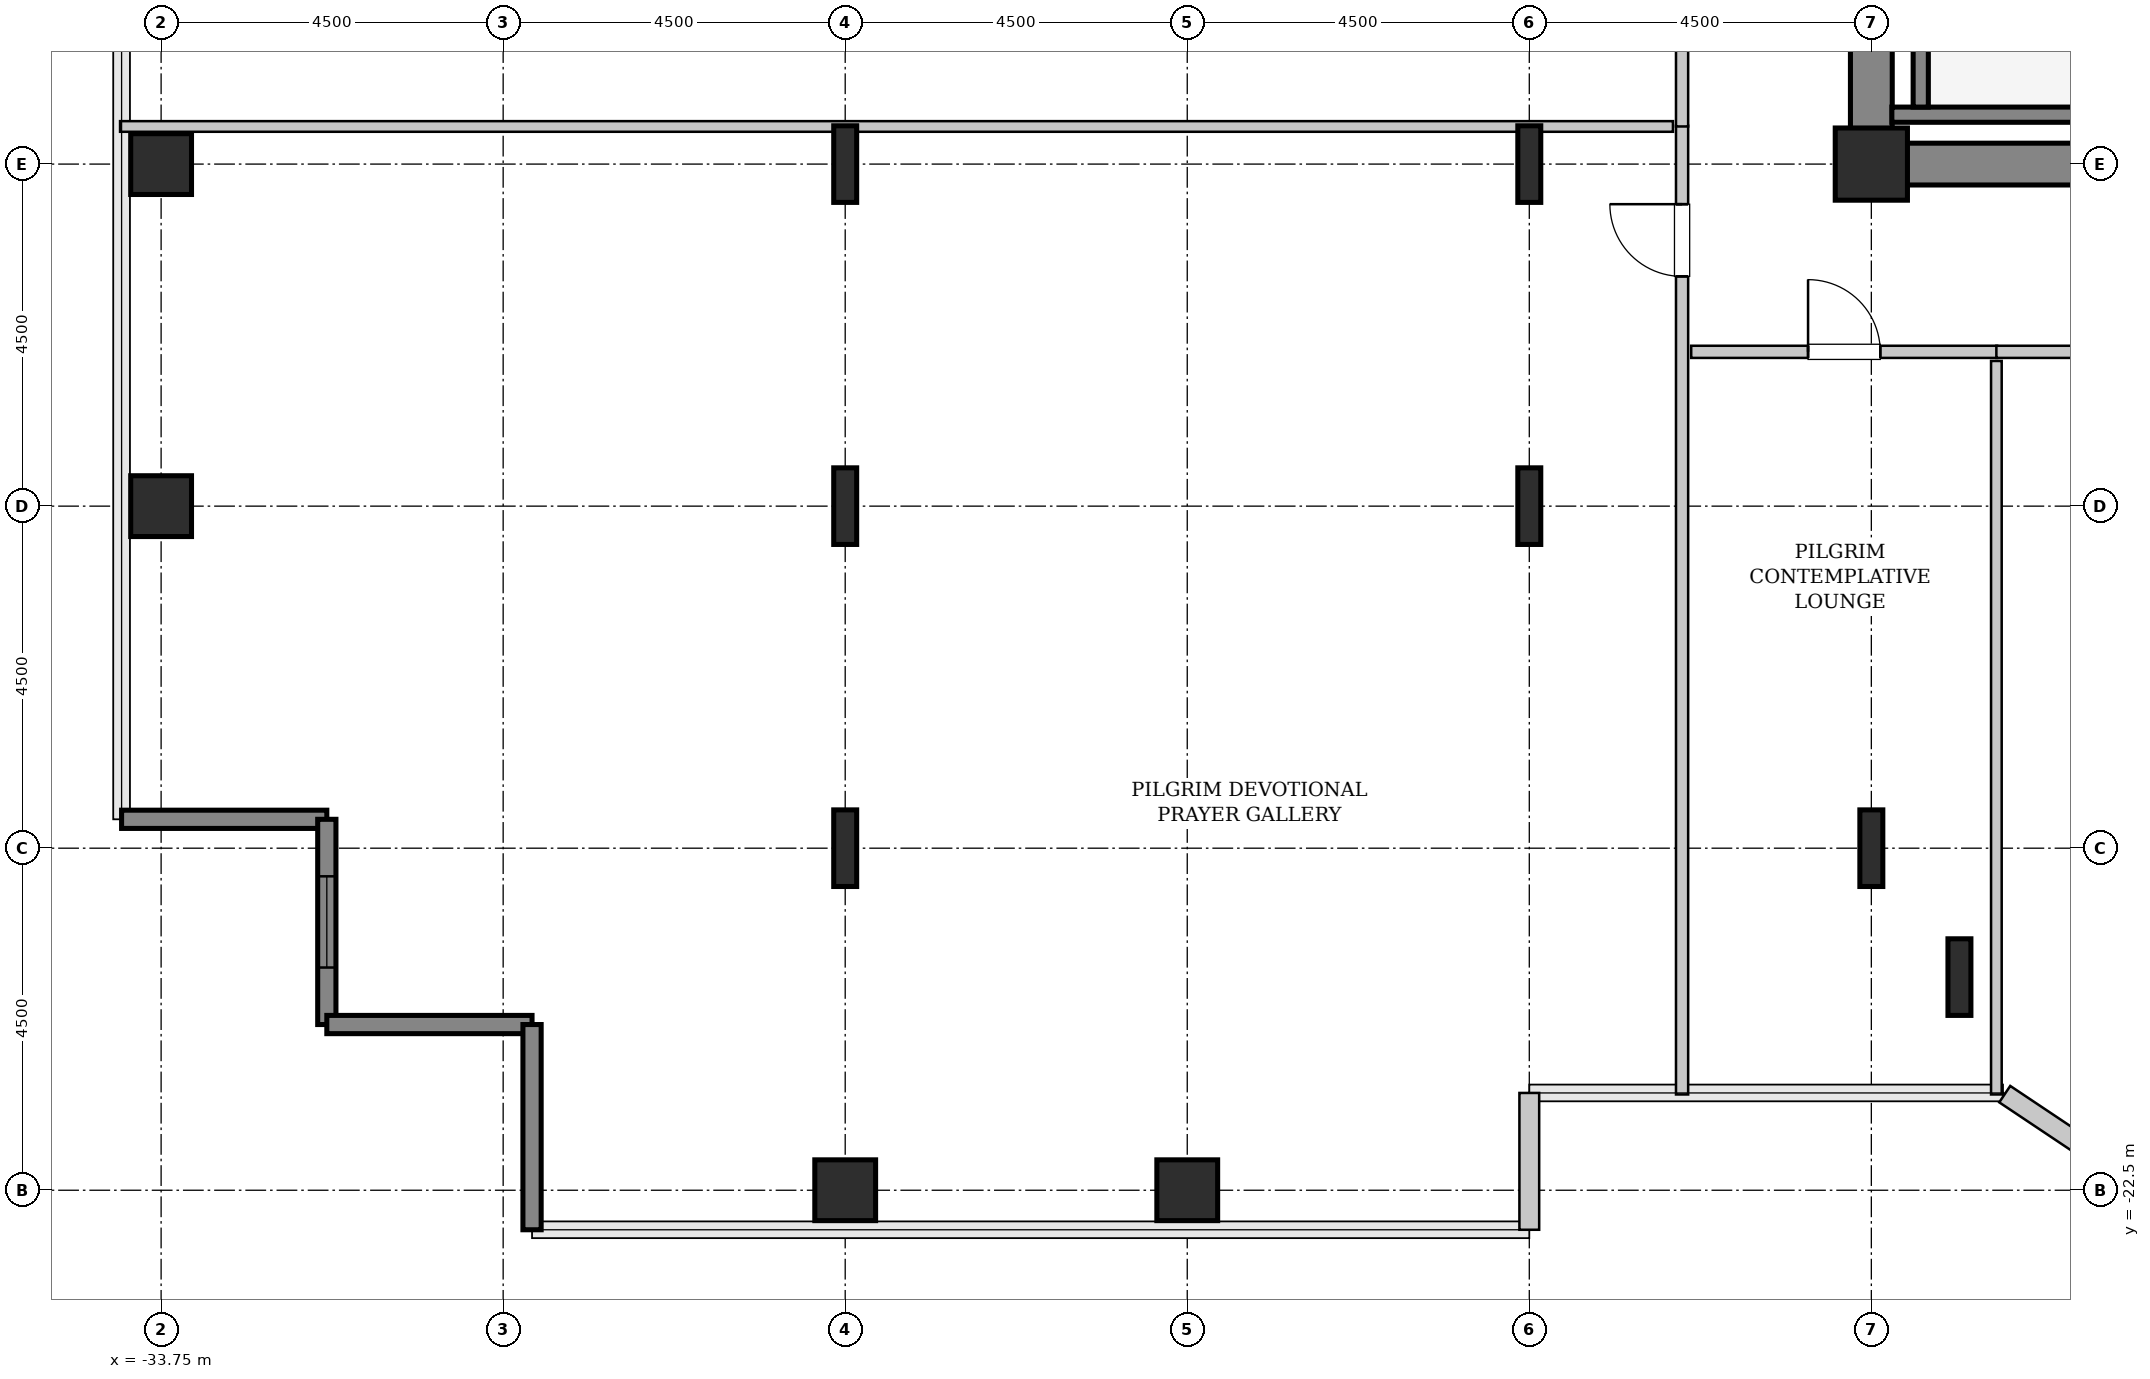
"""IFC4 building model, lengths in metres.
Left out: names, types, materials, properties, quantities, classifications, styles, units other than length and angle.
Written with IfcOpenShell. Run it as: python <this file> out.ifc"""

import sys

from ifc_helpers import new_model, si_unit, direction, frame, frame_2d, origin, origin_2d, place, context, subcontext, project, spatial, rectangle, hollow_rectangle, i_section, extrude, source, transform, mapped, element, fill, save


model = new_model("IFC4")
c1 = context("Model", 3, precision=1e-05, world=origin(), true_north=direction((0.0, 1.0)))
c2 = subcontext(c1, "Body", "Model", "MODEL_VIEW")
j1 = project(units=[si_unit("LENGTHUNIT", "METRE"), si_unit("PLANEANGLEUNIT", "RADIAN")], contexts=[c1])
p1 = place(None, origin())
s1 = spatial("IfcSite", under=j1, at=p1, CompositionType="ELEMENT")
p2 = place(p1, origin())
s2 = spatial("IfcBuilding", under=s1, at=p2, CompositionType="ELEMENT")
p3 = place(p2, frame((0.0, 0.0, 117.4)))
s3 = spatial("IfcBuildingStorey", under=s2, at=p3, CompositionType="ELEMENT", Elevation=117.4)
m1 = source(origin(), c2, "Body", "SweptSolid", [
    extrude(rectangle(XDim=9.975, YDim=0.55, at=frame_2d((4.987, 0.0))), origin(), (0.0, 0.0, 1.0), 3.8),
])
p4 = place(p3, frame((-11.525, -9.0, 0.0), z_axis=(0.0, 0.0, 1.0), x_axis=(1.0, 0.0, 0.0)))
e1 = element("IfcWall", 1, at=p4, inside=s3, PredefinedType="SHEAR", context=c2, shape_type="MappedRepresentation", body=[
    mapped(m1, transform((0.0, 0.0, 0.0), x_axis=(1.0, 0.0, 0.0), y_axis=(0.0, 1.0, 0.0), z_axis=(0.0, 0.0, 1.0), scale=1.0)),
])
m2 = source(origin(), c2, "Body", "SweptSolid", [
    extrude(rectangle(XDim=7.375, YDim=0.55, at=frame_2d((3.688, 0.0))), origin(), (0.0, 0.0, 1.0), 3.8),
])
p5 = place(p3, frame((-11.25, -8.725, 0.0), z_axis=(0.0, 0.0, 1.0), x_axis=(0.0, 1.0, 0.0)))
e2 = element("IfcWall", 2, at=p5, inside=s3, PredefinedType="SHEAR", context=c2, shape_type="MappedRepresentation", body=[
    mapped(m2, transform((0.0, 0.0, 0.0), x_axis=(1.0, 0.0, 0.0), y_axis=(0.0, 1.0, 0.0), z_axis=(0.0, 0.0, 1.0), scale=1.0)),
])
m3 = source(origin(), c2, "Body", "SweptSolid", [
    extrude(hollow_rectangle(XDim=0.8, YDim=0.8, WallThickness=0.04, InnerFilletRadius=0.04, OuterFilletRadius=0.08, at=origin_2d()), origin(), (0.0, 0.0, 1.0), 3.8),
])
for number, where, z_axis, x_axis in (
    (3, (-33.75, -13.5, 0.0), (0.0, 0.0, 1.0), (1.0, 0.0, 0.0)),
    (4, (-33.75, -9.0, 0.0), (0.0, 0.0, 1.0), (1.0, 0.0, 0.0)),
    (5, (-24.75, -22.5, 0.0), (0.0, 0.0, 1.0), (1.0, 0.0, 0.0)),
):
    element("IfcColumn", number, at=place(p3, frame(where, z_axis=z_axis, x_axis=x_axis)), inside=s3, PredefinedType="COLUMN", context=c2, shape_type="MappedRepresentation", body=[
        mapped(m3, transform((0.0, 0.0, 0.0), x_axis=(1.0, 0.0, 0.0), y_axis=(0.0, 1.0, 0.0), z_axis=(0.0, 0.0, 1.0), scale=1.0)),
    ])
m4 = source(origin(), c2, "Body", "SweptSolid", [
    extrude(i_section(OverallWidth=0.302, OverallDepth=1.008, WebThickness=0.021, FlangeThickness=0.04, FilletRadius=0.03, at=origin_2d()), origin(), (0.0, 0.0, 1.0), 3.8),
])
for number, where, z_axis, x_axis in (
    (6, (-24.75, -18.0, 0.0), (0.0, 0.0, 1.0), (1.0, 0.0, 0.0)),
    (7, (-24.75, -13.5, 0.0), (0.0, 0.0, 1.0), (1.0, 0.0, 0.0)),
    (8, (-24.75, -9.0, 0.0), (0.0, 0.0, 1.0), (1.0, 0.0, 0.0)),
):
    element("IfcColumn", number, at=place(p3, frame(where, z_axis=z_axis, x_axis=x_axis)), inside=s3, PredefinedType="COLUMN", context=c2, shape_type="MappedRepresentation", body=[
        mapped(m4, transform((0.0, 0.0, 0.0), x_axis=(1.0, 0.0, 0.0), y_axis=(0.0, 1.0, 0.0), z_axis=(0.0, 0.0, 1.0), scale=1.0)),
    ])
p6 = place(p3, frame((-20.25, -22.5, 0.0), z_axis=(0.0, 0.0, 1.0), x_axis=(1.0, 0.0, 0.0)))
e9 = element("IfcColumn", 9, at=p6, inside=s3, PredefinedType="COLUMN", context=c2, shape_type="MappedRepresentation", body=[
    mapped(m3, transform((0.0, 0.0, 0.0), x_axis=(1.0, 0.0, 0.0), y_axis=(0.0, 1.0, 0.0), z_axis=(0.0, 0.0, 1.0), scale=1.0)),
])
for number, where, z_axis, x_axis in (
    (10, (-15.75, -13.5, 0.0), (0.0, 0.0, 1.0), (1.0, 0.0, 0.0)),
    (11, (-15.75, -9.0, 0.0), (0.0, 0.0, 1.0), (1.0, 0.0, 0.0)),
    (12, (-11.25, -18.0, 0.0), (0.0, 0.0, 1.0), (1.0, 0.0, 0.0)),
):
    element("IfcColumn", number, at=place(p3, frame(where, z_axis=z_axis, x_axis=x_axis)), inside=s3, PredefinedType="COLUMN", context=c2, shape_type="MappedRepresentation", body=[
        mapped(m4, transform((0.0, 0.0, 0.0), x_axis=(1.0, 0.0, 0.0), y_axis=(0.0, 1.0, 0.0), z_axis=(0.0, 0.0, 1.0), scale=1.0)),
    ])
m5 = source(origin(), c2, "Body", "SweptSolid", [
    extrude(hollow_rectangle(XDim=0.95, YDim=0.95, WallThickness=0.045, InnerFilletRadius=0.045, OuterFilletRadius=0.09, at=origin_2d()), origin(), (0.0, 0.0, 1.0), 3.8),
])
p7 = place(p3, frame((-11.25, -9.0, 0.0), z_axis=(0.0, 0.0, 1.0), x_axis=(1.0, 0.0, 0.0)))
e13 = element("IfcColumn", 13, at=p7, inside=s3, PredefinedType="COLUMN", context=c2, shape_type="MappedRepresentation", body=[
    mapped(m5, transform((0.0, 0.0, 0.0), x_axis=(1.0, 0.0, 0.0), y_axis=(0.0, 1.0, 0.0), z_axis=(0.0, 0.0, 1.0), scale=1.0)),
])
p8 = place(p3, frame((-10.091, -19.696, 0.0), z_axis=(0.0, 0.0, 1.0), x_axis=(1.0, 0.0, 0.0)))
e14 = element("IfcColumn", 14, at=p8, inside=s3, PredefinedType="COLUMN", context=c2, shape_type="MappedRepresentation", body=[
    mapped(m4, transform((0.0, 0.0, 0.0), x_axis=(1.0, 0.0, 0.0), y_axis=(0.0, 1.0, 0.0), z_axis=(0.0, 0.0, 1.0), scale=1.0)),
])
m6 = source(origin(), c2, "Body", "SweptSolid", [
    extrude(rectangle(XDim=2.7, YDim=0.24, at=frame_2d((1.35, 0.0))), origin(), (0.0, 0.0, 1.0), 3.55),
])
p9 = place(p3, frame((-34.27, -17.62, 0.0), z_axis=(0.0, 0.0, 1.0), x_axis=(1.0, 0.0, 0.0)))
e15 = element("IfcWall", 15, at=p9, inside=s3, PredefinedType="SHEAR", context=c2, shape_type="MappedRepresentation", body=[
    mapped(m6, transform((0.0, 0.0, 0.0), x_axis=(1.0, 0.0, 0.0), y_axis=(0.0, 1.0, 0.0), z_axis=(0.0, 0.0, 1.0), scale=1.0)),
])
p10 = place(p3, frame((-31.57, -17.62, 0.0), z_axis=(0.0, 0.0, 1.0), x_axis=(0.0, -1.0, 0.0)))
e16 = element("IfcWall", 16, at=p10, inside=s3, PredefinedType="SHEAR", context=c2, shape_type="MappedRepresentation", body=[
    mapped(m6, transform((0.0, 0.0, 0.0), x_axis=(1.0, 0.0, 0.0), y_axis=(0.0, 1.0, 0.0), z_axis=(0.0, 0.0, 1.0), scale=1.0)),
])
p11 = place(p10, frame((0.75, 0.0, 0.85)))
e17 = element("IfcOpeningElement", 17, at=p11, cuts=e16, PredefinedType="OPENING", context=c2, shape_type="SweptSolid", body=[
    extrude(rectangle(XDim=1.2, YDim=1.8, at=frame_2d((0.6, 0.9))), frame((0.0, 0.13, 0.0), z_axis=(0.0, -1.0, 0.0), x_axis=(1.0, 0.0, 0.0)), (0.0, 0.0, 1.0), 0.26),
])
for number, where, z_axis, x_axis in (
    (18, (-31.57, -20.32, 0.0), (0.0, 0.0, 1.0), (1.0, 0.0, 0.0)),
    (19, (-28.87, -20.32, 0.0), (0.0, 0.0, 1.0), (0.0, -1.0, 0.0)),
):
    element("IfcWall", number, at=place(p3, frame(where, z_axis=z_axis, x_axis=x_axis)), inside=s3, PredefinedType="SHEAR", context=c2, shape_type="MappedRepresentation", body=[
        mapped(m6, transform((0.0, 0.0, 0.0), x_axis=(1.0, 0.0, 0.0), y_axis=(0.0, 1.0, 0.0), z_axis=(0.0, 0.0, 1.0), scale=1.0)),
    ])
m7 = source(origin(), c2, "Body", "SweptSolid", [
    extrude(rectangle(XDim=1.8, YDim=0.26, at=frame_2d((0.9, 0.0))), origin(), (0.0, 0.0, 1.0), 3.55),
])
p12 = place(p3, frame((-15.75, -23.02, 0.0), z_axis=(0.0, 0.0, 1.0), x_axis=(0.0, 1.0, 0.0)))
e20 = element("IfcWall", 20, at=p12, inside=s3, PredefinedType="SOLIDWALL", context=c2, shape_type="MappedRepresentation", body=[
    mapped(m7, transform((0.0, 0.0, 0.0), x_axis=(1.0, 0.0, 0.0), y_axis=(0.0, 1.0, 0.0), z_axis=(0.0, 0.0, 1.0), scale=1.0)),
])
m8 = source(origin(), c2, "Body", "SweptSolid", [
    extrude(rectangle(XDim=1.469, YDim=0.26, at=frame_2d((0.734, 0.0))), origin(), (0.0, 0.0, 1.0), 3.55),
])
p13 = place(p3, frame((-9.495, -21.236, 0.0), z_axis=(0.0, 0.0, 1.0), x_axis=(0.831461760506, -0.555581983884, 0.0)))
e21 = element("IfcWall", 21, at=p13, inside=s3, PredefinedType="SOLIDWALL", context=c2, shape_type="MappedRepresentation", body=[
    mapped(m8, transform((0.0, 0.0, 0.0), x_axis=(1.0, 0.0, 0.0), y_axis=(0.0, 1.0, 0.0), z_axis=(0.0, 0.0, 1.0), scale=1.0)),
])
m9 = source(origin(), c2, "Body", "SweptSolid", [
    extrude(rectangle(XDim=3.68, YDim=0.2, at=frame_2d((1.84, 0.0))), origin(), (0.0, 0.0, 1.0), 3.8),
])
p14 = place(p3, frame((-10.98, -8.35, 0.0), z_axis=(0.0, 0.0, 1.0), x_axis=(1.0, 0.0, 0.0)))
e22 = element("IfcWall", 22, at=p14, inside=s3, PredefinedType="SOLIDWALL", context=c2, shape_type="MappedRepresentation", body=[
    mapped(m9, transform((0.0, 0.0, 0.0), x_axis=(1.0, 0.0, 0.0), y_axis=(0.0, 1.0, 0.0), z_axis=(0.0, 0.0, 1.0), scale=1.0)),
])
m10 = source(origin(), c2, "Body", "SweptSolid", [
    extrude(rectangle(XDim=7.1, YDim=0.2, at=frame_2d((3.55, 0.0))), origin(), (0.0, 0.0, 1.0), 3.8),
])
p15 = place(p3, frame((-10.6, -1.15, 0.0), z_axis=(0.0, 0.0, 1.0), x_axis=(0.0, -1.0, 0.0)))
e23 = element("IfcWall", 23, at=p15, inside=s3, PredefinedType="SOLIDWALL", context=c2, shape_type="MappedRepresentation", body=[
    mapped(m10, transform((0.0, 0.0, 0.0), x_axis=(1.0, 0.0, 0.0), y_axis=(0.0, 1.0, 0.0), z_axis=(0.0, 0.0, 1.0), scale=1.0)),
])
m11 = source(origin(), c2, "Body", "SweptSolid", [
    extrude(rectangle(XDim=12.745, YDim=0.16, at=frame_2d((6.373, 0.0))), origin(), (0.0, 0.0, 1.0), 3.535),
])
p16 = place(p3, frame((-13.74, -21.24, 0.0), z_axis=(0.0, 0.0, 1.0), x_axis=(0.0, 1.0, 0.0)))
e24 = element("IfcWall", 24, at=p16, inside=s3, PredefinedType="PARTITIONING", context=c2, shape_type="MappedRepresentation", body=[
    mapped(m11, transform((0.0, 0.0, 0.0), x_axis=(1.0, 0.0, 0.0), y_axis=(0.0, 1.0, 0.0), z_axis=(0.0, 0.0, 1.0), scale=1.0)),
])
p17 = place(p16, frame((10.762, 0.0, 0.0)))
e25 = element("IfcOpeningElement", 25, at=p17, cuts=e24, PredefinedType="OPENING", context=c2, shape_type="SweptSolid", body=[
    extrude(rectangle(XDim=0.95, YDim=2.1, at=frame_2d((0.475, 1.05))), frame((0.0, 0.09, 0.0), z_axis=(0.0, -1.0, 0.0), x_axis=(1.0, 0.0, 0.0)), (0.0, 0.0, 1.0), 0.18),
])
m12 = source(origin(), c2, "Body", "SweptSolid", [
    extrude(rectangle(XDim=20.43, YDim=0.14, at=frame_2d((10.215, 0.0))), origin(), (0.0, 0.0, 1.0), 2.875),
])
p18 = place(p3, frame((-34.29, -8.505, 0.0), z_axis=(0.0, 0.0, 1.0), x_axis=(1.0, 0.0, 0.0)))
e26 = element("IfcWall", 26, at=p18, inside=s3, PredefinedType="PARTITIONING", context=c2, shape_type="MappedRepresentation", body=[
    mapped(m12, transform((0.0, 0.0, 0.0), x_axis=(1.0, 0.0, 0.0), y_axis=(0.0, 1.0, 0.0), z_axis=(0.0, 0.0, 1.0), scale=1.0)),
])
m13 = source(origin(), c2, "Body", "SweptSolid", [
    extrude(rectangle(XDim=3.31, YDim=0.16, at=frame_2d((1.655, 0.0))), origin(), (0.0, 0.0, 1.0), 3.535),
])
p19 = place(p3, frame((-13.74, -8.505, 0.0), z_axis=(0.0, 0.0, 1.0), x_axis=(0.0, 1.0, 0.0)))
e27 = element("IfcWall", 27, at=p19, inside=s3, PredefinedType="PARTITIONING", context=c2, shape_type="MappedRepresentation", body=[
    mapped(m13, transform((0.0, 0.0, 0.0), x_axis=(1.0, 0.0, 0.0), y_axis=(0.0, 1.0, 0.0), z_axis=(0.0, 0.0, 1.0), scale=1.0)),
])
p20 = place(p19, frame((1.18, 0.0, 0.0)))
e28 = element("IfcOpeningElement", 28, at=p20, cuts=e27, PredefinedType="OPENING", context=c2, shape_type="SweptSolid", body=[
    extrude(rectangle(XDim=0.95, YDim=2.1, at=frame_2d((0.475, 1.05))), frame((0.0, 0.09, 0.0), z_axis=(0.0, -1.0, 0.0), x_axis=(1.0, 0.0, 0.0)), (0.0, 0.0, 1.0), 0.18),
])
m14 = source(origin(), c2, "Body", "SweptSolid", [
    extrude(rectangle(XDim=4.025, YDim=0.16, at=frame_2d((2.013, 0.0))), origin(), (0.0, 0.0, 1.0), 3.535),
])
p21 = place(p3, frame((-13.62, -11.47, 0.0), z_axis=(0.0, 0.0, 1.0), x_axis=(1.0, 0.0, 0.0)))
e29 = element("IfcWall", 29, at=p21, inside=s3, PredefinedType="PARTITIONING", context=c2, shape_type="MappedRepresentation", body=[
    mapped(m14, transform((0.0, 0.0, 0.0), x_axis=(1.0, 0.0, 0.0), y_axis=(0.0, 1.0, 0.0), z_axis=(0.0, 0.0, 1.0), scale=1.0)),
])
p22 = place(p21, frame((1.538, 0.0, 0.0)))
e30 = element("IfcOpeningElement", 30, at=p22, cuts=e29, PredefinedType="OPENING", context=c2, shape_type="SweptSolid", body=[
    extrude(rectangle(XDim=0.95, YDim=2.1, at=frame_2d((0.475, 1.05))), frame((0.0, 0.09, 0.0), z_axis=(0.0, -1.0, 0.0), x_axis=(1.0, 0.0, 0.0)), (0.0, 0.0, 1.0), 0.18),
])
m15 = source(origin(), c2, "Body", "SweptSolid", [
    extrude(rectangle(XDim=9.65, YDim=0.14, at=frame_2d((4.825, 0.0))), origin(), (0.0, 0.0, 1.0), 3.535),
])
p23 = place(p3, frame((-9.605, -21.24, 0.0), z_axis=(0.0, 0.0, 1.0), x_axis=(0.0, 1.0, 0.0)))
e31 = element("IfcWall", 31, at=p23, inside=s3, PredefinedType="PARTITIONING", context=c2, shape_type="MappedRepresentation", body=[
    mapped(m15, transform((0.0, 0.0, 0.0), x_axis=(1.0, 0.0, 0.0), y_axis=(0.0, 1.0, 0.0), z_axis=(0.0, 0.0, 1.0), scale=1.0)),
])
m16 = source(origin(), c2, "Body", "SweptSolid", [
    extrude(rectangle(XDim=4.61, YDim=0.16, at=frame_2d((2.305, 0.0))), origin(), (0.0, 0.0, 1.0), 3.535),
])
p24 = place(p3, frame((-9.605, -11.47, 0.0), z_axis=(0.0, 0.0, 1.0), x_axis=(1.0, 0.0, 0.0)))
e32 = element("IfcWall", 32, at=p24, inside=s3, PredefinedType="PARTITIONING", context=c2, shape_type="MappedRepresentation", body=[
    mapped(m16, transform((0.0, 0.0, 0.0), x_axis=(1.0, 0.0, 0.0), y_axis=(0.0, 1.0, 0.0), z_axis=(0.0, 0.0, 1.0), scale=1.0)),
])
p25 = place(p24, frame((1.83, 0.0, 0.0)))
e33 = element("IfcOpeningElement", 33, at=p25, cuts=e32, PredefinedType="OPENING", context=c2, shape_type="SweptSolid", body=[
    extrude(rectangle(XDim=0.95, YDim=2.1, at=frame_2d((0.475, 1.05))), frame((0.0, 0.09, 0.0), z_axis=(0.0, -1.0, 0.0), x_axis=(1.0, 0.0, 0.0)), (0.0, 0.0, 1.0), 0.18),
])
m17 = source(origin(), c2, "Body", "SweptSolid", [
    extrude(rectangle(XDim=1.2, YDim=1.8, at=frame_2d((0.6, 0.9))), frame((0.0, 0.03, 0.0), z_axis=(0.0, -1.0, 0.0), x_axis=(1.0, 0.0, 0.0)), (0.0, 0.0, 1.0), 0.06),
])
p26 = place(p11, origin())
e34 = element("IfcWindow", 34, at=p26, inside=s3, PartitioningType="SINGLE_PANEL", PredefinedType="WINDOW", context=c2, shape_type="MappedRepresentation", body=[
    mapped(m17, transform((0.0, 0.0, 0.0), x_axis=(1.0, 0.0, 0.0), y_axis=(0.0, 1.0, 0.0), z_axis=(0.0, 0.0, 1.0), scale=1.0)),
])
fill(e17, e34)
m18 = source(origin(), c2, "Body", "SweptSolid", [
    extrude(rectangle(XDim=0.95, YDim=2.1, at=frame_2d((0.475, 1.05))), frame((0.0, 0.025, 0.0), z_axis=(0.0, -1.0, 0.0), x_axis=(1.0, 0.0, 0.0)), (0.0, 0.0, 1.0), 0.05),
])
p27 = place(p17, origin())
e35 = element("IfcDoor", 35, at=p27, inside=s3, OperationType="SINGLE_SWING_RIGHT", PredefinedType="DOOR", context=c2, shape_type="MappedRepresentation", body=[
    mapped(m18, transform((0.0, 0.0, 0.0), x_axis=(1.0, 0.0, 0.0), y_axis=(0.0, 1.0, 0.0), z_axis=(0.0, 0.0, 1.0), scale=1.0)),
])
fill(e25, e35)
p28 = place(p22, origin())
e36 = element("IfcDoor", 36, at=p28, inside=s3, OperationType="SINGLE_SWING_LEFT", PredefinedType="DOOR", context=c2, shape_type="MappedRepresentation", body=[
    mapped(m18, transform((0.0, 0.0, 0.0), x_axis=(1.0, 0.0, 0.0), y_axis=(0.0, 1.0, 0.0), z_axis=(0.0, 0.0, 1.0), scale=1.0)),
])
fill(e30, e36)
save(model, sys.argv[1])
